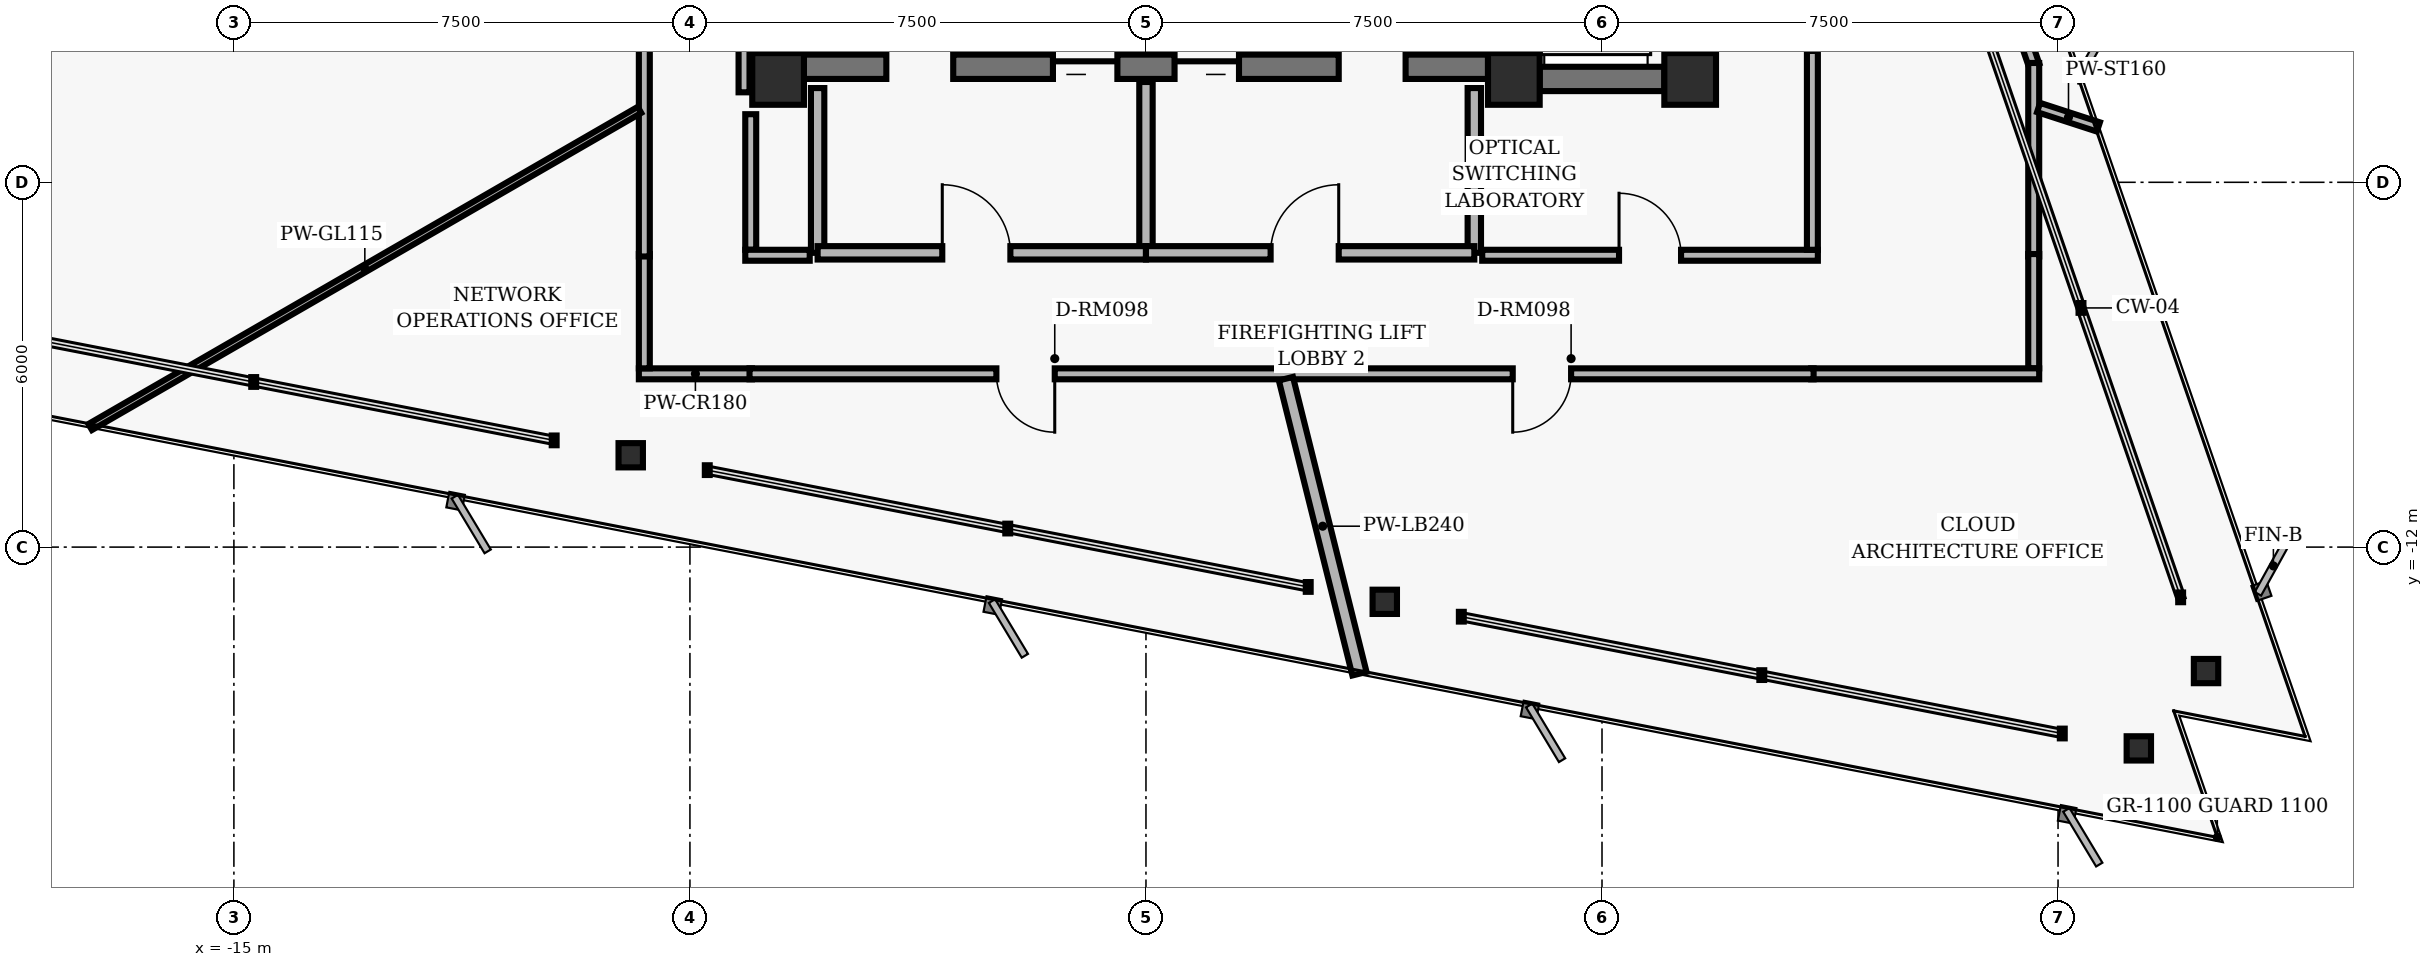
"""IFC4 building model, lengths in metres.
Left out: names, types, materials, properties, quantities, classifications, styles, units other than length and angle.
Written with IfcOpenShell. Run it as: python <this file> out.ifc"""

import sys

from ifc_helpers import new_model, si_unit, direction, frame, frame_2d, origin, origin_2d, place, context, subcontext, project, spatial, rectangle, hollow_rectangle, i_section, extrude, element, fill, save


model = new_model("IFC4")
c1 = context("Model", 3, precision=1e-05, world=origin(), true_north=direction((0.0, 1.0)))
c2 = subcontext(c1, "Body", "Model", "MODEL_VIEW")
j1 = project(units=[si_unit("LENGTHUNIT", "METRE"), si_unit("PLANEANGLEUNIT", "RADIAN")], contexts=[c1])
p1 = place(None, origin())
s1 = spatial("IfcSite", under=j1, at=p1, CompositionType="ELEMENT")
p2 = place(p1, origin())
s2 = spatial("IfcBuilding", under=s1, at=p2, CompositionType="ELEMENT")
p3 = place(p2, frame((0.0, 0.0, 153.28)))
s3 = spatial("IfcBuildingStorey", under=s2, at=p3, CompositionType="ELEMENT", Elevation=153.28)
for number, where, z_axis, x_axis in (
    (1, (-6.05, -4.3, 0.0), (0.0, 0.0, 1.0), (1.0, 0.0, 0.0)),
    (2, (6.05, -4.3, 0.0), (0.0, 0.0, 1.0), (1.0, 0.0, 0.0)),
    (3, (8.95, -4.3, 0.0), (0.0, 0.0, 1.0), (1.0, 0.0, 0.0)),
):
    element("IfcColumn", number, at=place(p3, frame(where, z_axis=z_axis, x_axis=x_axis)), inside=s3, PredefinedType="COLUMN", context=c2, shape_type="SweptSolid", body=[
        extrude(hollow_rectangle(XDim=0.85, YDim=0.85, WallThickness=0.055, InnerFilletRadius=0.02, OuterFilletRadius=0.04, at=origin_2d()), origin(), (0.0, 0.0, 1.0), 3.04),
    ])
for number, where, z_axis, x_axis in (
    (4, (-6.05, -3.875, 0.0), (0.0, 0.0, 1.0), (0.0, 1.0, 0.0)),
    (5, (6.05, -3.875, 0.0), (0.0, 0.0, 1.0), (0.0, 1.0, 0.0)),
):
    element("IfcWall", number, at=place(p3, frame(where, z_axis=z_axis, x_axis=x_axis)), inside=s3, PredefinedType="SHEAR", context=c2, shape_type="SweptSolid", body=[
        extrude(rectangle(XDim=3.45, YDim=0.6, at=frame_2d((1.725, 0.0))), origin(), (0.0, 0.0, 1.0), 2.788),
    ])
for number, where, z_axis, x_axis in (
    (6, (-1.94, -4.1, 0.0), (0.0, 0.0, 1.0), (0.0, 1.0, 0.0)),
    (7, (1.94, -4.1, 0.0), (0.0, 0.0, 1.0), (0.0, 1.0, 0.0)),
):
    element("IfcWall", number, at=place(p3, frame(where, z_axis=z_axis, x_axis=x_axis)), inside=s3, PredefinedType="SHEAR", context=c2, shape_type="SweptSolid", body=[
        extrude(rectangle(XDim=8.2, YDim=0.35, at=frame_2d((4.1, 0.0))), origin(), (0.0, 0.0, 1.0), 2.788),
    ])
p4 = place(p3, frame((-5.625, -4.1, 0.0), z_axis=(0.0, 0.0, 1.0), x_axis=(1.0, 0.0, 0.0)))
e8 = element("IfcWall", 8, at=p4, inside=s3, PredefinedType="SHEAR", context=c2, shape_type="SweptSolid", body=[
    extrude(rectangle(XDim=11.25, YDim=0.4, at=frame_2d((5.625, 0.0))), origin(), (0.0, 0.0, 1.0), 2.788),
])
p5 = place(p4, frame((1.355, 0.0, 0.0)))
e9 = element("IfcOpeningElement", 9, at=p5, cuts=e8, PredefinedType="OPENING", context=c2, shape_type="SweptSolid", body=[
    extrude(rectangle(XDim=1.1, YDim=2.04, at=frame_2d((0.55, 1.02))), frame((0.0, 0.21, 0.0), z_axis=(0.0, -1.0, 0.0), x_axis=(1.0, 0.0, 0.0)), (0.0, 0.0, 1.0), 0.42),
])
p6 = place(p4, frame((8.795, 0.0, 0.0)))
e10 = element("IfcOpeningElement", 10, at=p6, cuts=e8, PredefinedType="OPENING", context=c2, shape_type="SweptSolid", body=[
    extrude(rectangle(XDim=1.1, YDim=2.04, at=frame_2d((0.55, 1.02))), frame((0.0, 0.21, 0.0), z_axis=(0.0, -1.0, 0.0), x_axis=(1.0, 0.0, 0.0)), (0.0, 0.0, 1.0), 0.42),
])
p7 = place(p4, frame((4.095, 0.0, 0.0)))
e11 = element("IfcOpeningElement", 11, at=p7, cuts=e8, PredefinedType="OPENING", context=c2, shape_type="SweptSolid", body=[
    extrude(rectangle(XDim=1.06, YDim=2.04, at=frame_2d((0.53, 1.02))), frame((0.0, 0.21, 0.0), z_axis=(0.0, -1.0, 0.0), x_axis=(1.0, 0.0, 0.0)), (0.0, 0.0, 1.0), 0.42),
])
p8 = place(p4, frame((6.095, 0.0, 0.0)))
e12 = element("IfcOpeningElement", 12, at=p8, cuts=e8, PredefinedType="OPENING", context=c2, shape_type="SweptSolid", body=[
    extrude(rectangle(XDim=1.06, YDim=2.04, at=frame_2d((0.53, 1.02))), frame((0.0, 0.21, 0.0), z_axis=(0.0, -1.0, 0.0), x_axis=(1.0, 0.0, 0.0)), (0.0, 0.0, 1.0), 0.42),
])
p9 = place(p3, frame((8.95, -3.875, 0.0), z_axis=(0.0, 0.0, 1.0), x_axis=(0.0, 1.0, 0.0)))
e13 = element("IfcWall", 13, at=p9, inside=s3, PredefinedType="SHEAR", context=c2, shape_type="SweptSolid", body=[
    extrude(rectangle(XDim=7.95, YDim=0.6, at=frame_2d((3.975, 0.0))), origin(), (0.0, 0.0, 1.0), 2.788),
])
p10 = place(p9, frame((0.55, 0.0, 0.0)))
e14 = element("IfcOpeningElement", 14, at=p10, cuts=e13, PredefinedType="OPENING", context=c2, shape_type="SweptSolid", body=[
    extrude(rectangle(XDim=1.06, YDim=2.04, at=frame_2d((0.53, 1.02))), frame((0.0, 0.31, 0.0), z_axis=(0.0, -1.0, 0.0), x_axis=(1.0, 0.0, 0.0)), (0.0, 0.0, 1.0), 0.62),
])
p11 = place(p9, frame((3.445, 0.0, 0.0)))
e15 = element("IfcOpeningElement", 15, at=p11, cuts=e13, PredefinedType="OPENING", context=c2, shape_type="SweptSolid", body=[
    extrude(rectangle(XDim=1.06, YDim=2.04, at=frame_2d((0.53, 1.02))), frame((0.0, 0.31, 0.0), z_axis=(0.0, -1.0, 0.0), x_axis=(1.0, 0.0, 0.0)), (0.0, 0.0, 1.0), 0.62),
])
p12 = place(p9, frame((6.33, 0.0, 0.0)))
e16 = element("IfcOpeningElement", 16, at=p12, cuts=e13, PredefinedType="OPENING", context=c2, shape_type="SweptSolid", body=[
    extrude(rectangle(XDim=1.06, YDim=2.04, at=frame_2d((0.53, 1.02))), frame((0.0, 0.31, 0.0), z_axis=(0.0, -1.0, 0.0), x_axis=(1.0, 0.0, 0.0)), (0.0, 0.0, 1.0), 0.62),
])
p13 = place(p3, frame((6.475, -4.3, 0.0), z_axis=(0.0, 0.0, 1.0), x_axis=(1.0, 0.0, 0.0)))
e17 = element("IfcWall", 17, at=p13, inside=s3, PredefinedType="SHEAR", context=c2, shape_type="SweptSolid", body=[
    extrude(rectangle(XDim=2.05, YDim=0.4, at=frame_2d((1.025, 0.0))), origin(), (0.0, 0.0, 1.0), 2.788),
])
for number, where, z_axis, x_axis in (
    (18, (17.434, -14.039, 0.0), (0.0, 0.0, 1.0), (1.0, 0.0, 0.0)),
    (19, (-8.474, -10.49, 0.0), (0.0, 0.0, 1.0), (1.0, 0.0, 0.0)),
    (20, (3.927, -12.9, 0.0), (0.0, 0.0, 1.0), (1.0, 0.0, 0.0)),
    (21, (16.329, -15.311, 0.0), (0.0, 0.0, 1.0), (1.0, 0.0, 0.0)),
):
    element("IfcColumn", number, at=place(p3, frame(where, z_axis=z_axis, x_axis=x_axis)), inside=s3, PredefinedType="COLUMN", context=c2, shape_type="SweptSolid", body=[
        extrude(i_section(OverallWidth=0.401, OverallDepth=0.399, WebThickness=0.025, FlangeThickness=0.04, FilletRadius=0.018, at=origin_2d()), origin(), (0.0, 0.0, 1.0), 3.04),
    ])
for number, where, z_axis, x_axis in (
    (22, (-5.4, -7.16, 0.0), (0.0, 0.0, 1.0), (0.0, 1.0, 0.0)),
    (23, (5.4, -7.16, 0.0), (0.0, 0.0, 1.0), (0.0, 1.0, 0.0)),
):
    element("IfcWall", number, at=place(p3, frame(where, z_axis=z_axis, x_axis=x_axis)), inside=s3, PredefinedType="PARTITIONING", context=c2, shape_type="SweptSolid", body=[
        extrude(rectangle(XDim=2.71, YDim=0.22, at=frame_2d((1.355, 0.0))), origin(), (0.0, 0.0, 1.0), 2.763),
    ])
p14 = place(p3, frame((0.0, -7.16, 0.0), z_axis=(0.0, 0.0, 1.0), x_axis=(0.0, 1.0, 0.0)))
e24 = element("IfcWall", 24, at=p14, inside=s3, PredefinedType="PARTITIONING", context=c2, shape_type="SweptSolid", body=[
    extrude(rectangle(XDim=2.81, YDim=0.22, at=frame_2d((1.405, 0.0))), origin(), (0.0, 0.0, 1.0), 2.763),
])
p15 = place(p3, frame((-5.4, -7.16, 0.0), z_axis=(0.0, 0.0, 1.0), x_axis=(1.0, 0.0, 0.0)))
e25 = element("IfcWall", 25, at=p15, inside=s3, PredefinedType="PARTITIONING", context=c2, shape_type="SweptSolid", body=[
    extrude(rectangle(XDim=5.4, YDim=0.22, at=frame_2d((2.7, 0.0))), origin(), (0.0, 0.0, 1.0), 2.33),
])
p16 = place(p15, frame((2.05, 0.0, 0.0)))
e26 = element("IfcOpeningElement", 26, at=p16, cuts=e25, PredefinedType="OPENING", context=c2, shape_type="SweptSolid", body=[
    extrude(rectangle(XDim=1.12, YDim=2.02, at=frame_2d((0.56, 1.01))), frame((0.0, 0.12, 0.0), z_axis=(0.0, -1.0, 0.0), x_axis=(1.0, 0.0, 0.0)), (0.0, 0.0, 1.0), 0.24),
])
p17 = place(p3, frame((0.0, -7.16, 0.0), z_axis=(0.0, 0.0, 1.0), x_axis=(1.0, 0.0, 0.0)))
e27 = element("IfcWall", 27, at=p17, inside=s3, PredefinedType="PARTITIONING", context=c2, shape_type="SweptSolid", body=[
    extrude(rectangle(XDim=5.4, YDim=0.22, at=frame_2d((2.7, 0.0))), origin(), (0.0, 0.0, 1.0), 2.33),
])
p18 = place(p17, frame((2.05, 0.0, 0.0)))
e28 = element("IfcOpeningElement", 28, at=p18, cuts=e27, PredefinedType="OPENING", context=c2, shape_type="SweptSolid", body=[
    extrude(rectangle(XDim=1.12, YDim=2.02, at=frame_2d((0.56, 1.01))), frame((0.0, 0.12, 0.0), z_axis=(0.0, -1.0, 0.0), x_axis=(1.0, 0.0, 0.0)), (0.0, 0.0, 1.0), 0.24),
])
p19 = place(p3, frame((-6.48, -9.15, 0.0), z_axis=(0.0, 0.0, 1.0), x_axis=(-1.0, 0.0, 0.0)))
e29 = element("IfcWall", 29, at=p19, inside=s3, PredefinedType="PARTITIONING", context=c2, shape_type="SweptSolid", body=[
    extrude(rectangle(XDim=1.86, YDim=0.18, at=frame_2d((0.93, 0.0))), origin(), (0.0, 0.0, 1.0), 2.33),
])
p20 = place(p3, frame((-8.25, -9.06, 0.0), z_axis=(0.0, 0.0, 1.0), x_axis=(0.0, 1.0, 0.0)))
e30 = element("IfcWall", 30, at=p20, inside=s3, PredefinedType="PARTITIONING", context=c2, shape_type="SweptSolid", body=[
    extrude(rectangle(XDim=1.88, YDim=0.18, at=frame_2d((0.94, 0.0))), origin(), (0.0, 0.0, 1.0), 2.763),
])
p21 = place(p3, frame((-8.25, -7.22, 0.0), z_axis=(0.0, 0.0, 1.0), x_axis=(0.0, 1.0, 0.0)))
e31 = element("IfcWall", 31, at=p21, inside=s3, PredefinedType="PARTITIONING", context=c2, shape_type="SweptSolid", body=[
    extrude(rectangle(XDim=14.44, YDim=0.18, at=frame_2d((7.22, 0.0))), origin(), (0.0, 0.0, 1.0), 2.763),
])
p22 = place(p21, frame((7.366, 0.0, 0.0)))
e32 = element("IfcOpeningElement", 32, at=p22, cuts=e31, PredefinedType="OPENING", context=c2, shape_type="SweptSolid", body=[
    extrude(rectangle(XDim=0.96, YDim=2.02, at=frame_2d((0.48, 1.01))), frame((0.0, 0.1, 0.0), z_axis=(0.0, -1.0, 0.0), x_axis=(1.0, 0.0, 0.0)), (0.0, 0.0, 1.0), 0.2),
])
p23 = place(p3, frame((-6.61, 4.94, 0.0), z_axis=(0.0, 0.0, 1.0), x_axis=(0.0, -1.0, 0.0)))
e33 = element("IfcWall", 33, at=p23, inside=s3, PredefinedType="PARTITIONING", context=c2, shape_type="SweptSolid", body=[
    extrude(rectangle(XDim=9.46, YDim=0.18, at=frame_2d((4.73, 0.0))), origin(), (0.0, 0.0, 1.0), 2.763),
])
p24 = place(p3, frame((-6.5, -4.88, 0.0), z_axis=(0.0, 0.0, 1.0), x_axis=(0.0, -1.0, 0.0)))
e34 = element("IfcWall", 34, at=p24, inside=s3, PredefinedType="PARTITIONING", context=c2, shape_type="SweptSolid", body=[
    extrude(rectangle(XDim=2.23, YDim=0.18, at=frame_2d((1.115, 0.0))), origin(), (0.0, 0.0, 1.0), 2.763),
])
p25 = place(p3, frame((-6.59, -7.2, 0.0), z_axis=(0.0, 0.0, 1.0), x_axis=(1.0, 0.0, 0.0)))
e35 = element("IfcWall", 35, at=p25, inside=s3, PredefinedType="PARTITIONING", context=c2, shape_type="SweptSolid", body=[
    extrude(rectangle(XDim=1.06, YDim=0.18, at=frame_2d((0.53, 0.0))), origin(), (0.0, 0.0, 1.0), 2.763),
])
p26 = place(p3, frame((5.53, -7.2, 0.0), z_axis=(0.0, 0.0, 1.0), x_axis=(1.0, 0.0, 0.0)))
e36 = element("IfcWall", 36, at=p26, inside=s3, PredefinedType="PARTITIONING", context=c2, shape_type="SweptSolid", body=[
    extrude(rectangle(XDim=5.52, YDim=0.18, at=frame_2d((2.76, 0.0))), origin(), (0.0, 0.0, 1.0), 2.33),
])
p27 = place(p26, frame((2.25, 0.0, 0.0)))
e37 = element("IfcOpeningElement", 37, at=p27, cuts=e36, PredefinedType="OPENING", context=c2, shape_type="SweptSolid", body=[
    extrude(rectangle(XDim=1.02, YDim=2.02, at=frame_2d((0.51, 1.01))), frame((0.0, 0.1, 0.0), z_axis=(0.0, -1.0, 0.0), x_axis=(1.0, 0.0, 0.0)), (0.0, 0.0, 1.0), 0.2),
])
p28 = place(p3, frame((10.96, -7.11, 0.0), z_axis=(0.0, 0.0, 1.0), x_axis=(0.0, 1.0, 0.0)))
e38 = element("IfcWall", 38, at=p28, inside=s3, PredefinedType="PARTITIONING", context=c2, shape_type="SweptSolid", body=[
    extrude(rectangle(XDim=3.271, YDim=0.18, at=frame_2d((1.635, 0.0))), origin(), (0.0, 0.0, 1.0), 2.763),
])
p29 = place(p3, frame((10.954, 6.533, 0.0), z_axis=(0.0, 0.0, 1.0), x_axis=(0.325553439946, -0.945523642084, 0.0)))
e39 = element("IfcWall", 39, at=p29, inside=s3, PredefinedType="PARTITIONING", context=c2, shape_type="SweptSolid", body=[
    extrude(rectangle(XDim=11.22, YDim=0.18, at=frame_2d((5.61, 0.0))), origin(), (0.0, 0.0, 1.0), 2.763),
])
p30 = place(p3, frame((14.6, -4.038, 0.0), z_axis=(0.0, 0.0, 1.0), x_axis=(0.0, -1.0, 0.0)))
e40 = element("IfcWall", 40, at=p30, inside=s3, PredefinedType="PARTITIONING", context=c2, shape_type="SweptSolid", body=[
    extrude(rectangle(XDim=3.182, YDim=0.18, at=frame_2d((1.591, 0.0))), origin(), (0.0, 0.0, 1.0), 2.763),
])
p31 = place(p3, frame((14.6, -7.18, 0.0), z_axis=(0.0, 0.0, 1.0), x_axis=(0.0, -1.0, 0.0)))
e41 = element("IfcWall", 41, at=p31, inside=s3, PredefinedType="PARTITIONING", context=c2, shape_type="SweptSolid", body=[
    extrude(rectangle(XDim=1.88, YDim=0.18, at=frame_2d((0.94, 0.0))), origin(), (0.0, 0.0, 1.0), 2.763),
])
p32 = place(p3, frame((14.69, -9.15, 0.0), z_axis=(0.0, 0.0, 1.0), x_axis=(-1.0, 0.0, 0.0)))
e42 = element("IfcWall", 42, at=p32, inside=s3, PredefinedType="PARTITIONING", context=c2, shape_type="SweptSolid", body=[
    extrude(rectangle(XDim=3.75, YDim=0.18, at=frame_2d((1.875, 0.0))), origin(), (0.0, 0.0, 1.0), 2.763),
])
p33 = place(p3, frame((10.98, -9.15, 0.0), z_axis=(0.0, 0.0, 1.0), x_axis=(-1.0, 0.0, 0.0)))
e43 = element("IfcWall", 43, at=p33, inside=s3, PredefinedType="PARTITIONING", context=c2, shape_type="SweptSolid", body=[
    extrude(rectangle(XDim=17.5, YDim=0.18, at=frame_2d((8.75, 0.0))), origin(), (0.0, 0.0, 1.0), 2.33),
])
p34 = place(p33, frame((12.48, 0.0, 0.0)))
e44 = element("IfcOpeningElement", 44, at=p34, cuts=e43, PredefinedType="OPENING", context=c2, shape_type="SweptSolid", body=[
    extrude(rectangle(XDim=0.96, YDim=2.02, at=frame_2d((0.48, 1.01))), frame((0.0, 0.1, 0.0), z_axis=(0.0, -1.0, 0.0), x_axis=(1.0, 0.0, 0.0)), (0.0, 0.0, 1.0), 0.2),
])
p35 = place(p33, frame((3.988, 0.0, 0.0)))
e45 = element("IfcOpeningElement", 45, at=p35, cuts=e43, PredefinedType="OPENING", context=c2, shape_type="SweptSolid", body=[
    extrude(rectangle(XDim=0.96, YDim=2.02, at=frame_2d((0.48, 1.01))), frame((0.0, 0.1, 0.0), z_axis=(0.0, -1.0, 0.0), x_axis=(1.0, 0.0, 0.0)), (0.0, 0.0, 1.0), 0.2),
])
p36 = place(p3, frame((-8.33, -4.809, 0.0), z_axis=(0.0, 0.0, 1.0), x_axis=(-0.866024997974, -0.500000702884, 0.0)))
e46 = element("IfcWall", 46, at=p36, inside=s3, PredefinedType="MOVABLE", context=c2, shape_type="SweptSolid", body=[
    extrude(rectangle(XDim=10.431, YDim=0.115, at=frame_2d((5.215, 0.0))), origin(), (0.0, 0.0, 1.0), 2.132),
])
p37 = place(p3, frame((2.301, -9.23, 0.0), z_axis=(0.0, 0.0, 1.0), x_axis=(0.241903783585, -0.970300241929, 0.0)))
e47 = element("IfcWall", 47, at=p37, inside=s3, PredefinedType="PARTITIONING", context=c2, shape_type="SweptSolid", body=[
    extrude(rectangle(XDim=5.001, YDim=0.24, at=frame_2d((2.5, 0.0))), origin(), (0.0, 0.0, 1.0), 2.763),
])
p38 = place(p3, frame((14.68, -4.77, 0.0), z_axis=(0.0, 0.0, 1.0), x_axis=(0.951039270022, -0.309070067906, 0.0)))
e48 = element("IfcWall", 48, at=p38, inside=s3, PredefinedType="PARTITIONING", context=c2, shape_type="SweptSolid", body=[
    extrude(rectangle(XDim=1.035, YDim=0.16, at=frame_2d((0.518, 0.0))), origin(), (0.0, 0.0, 1.0), 2.763),
])
p39 = place(p5, origin())
e49 = element("IfcDoor", 49, at=p39, inside=s3, OperationType="SINGLE_SWING_LEFT", PredefinedType="DOOR", context=c2, shape_type="SweptSolid", body=[
    extrude(rectangle(XDim=1.1, YDim=2.04, at=frame_2d((0.55, 1.02))), frame((0.0, 0.025, 0.0), z_axis=(0.0, -1.0, 0.0), x_axis=(1.0, 0.0, 0.0)), (0.0, 0.0, 1.0), 0.05),
])
fill(e9, e49)
p40 = place(p6, origin())
e50 = element("IfcDoor", 50, at=p40, inside=s3, OperationType="SINGLE_SWING_RIGHT", PredefinedType="DOOR", context=c2, shape_type="SweptSolid", body=[
    extrude(rectangle(XDim=1.1, YDim=2.04, at=frame_2d((0.55, 1.02))), frame((0.0, 0.025, 0.0), z_axis=(0.0, -1.0, 0.0), x_axis=(1.0, 0.0, 0.0)), (0.0, 0.0, 1.0), 0.05),
])
fill(e10, e50)
p41 = place(p7, origin())
e51 = element("IfcDoor", 51, at=p41, inside=s3, OperationType="SLIDING_TO_LEFT", PredefinedType="DOOR", context=c2, shape_type="SweptSolid", body=[
    extrude(rectangle(XDim=1.06, YDim=2.04, at=frame_2d((0.53, 1.02))), frame((0.0, 0.025, 0.0), z_axis=(0.0, -1.0, 0.0), x_axis=(1.0, 0.0, 0.0)), (0.0, 0.0, 1.0), 0.05),
])
fill(e11, e51)
p42 = place(p8, origin())
e52 = element("IfcDoor", 52, at=p42, inside=s3, OperationType="SLIDING_TO_RIGHT", PredefinedType="DOOR", context=c2, shape_type="SweptSolid", body=[
    extrude(rectangle(XDim=1.06, YDim=2.04, at=frame_2d((0.53, 1.02))), frame((0.0, 0.025, 0.0), z_axis=(0.0, -1.0, 0.0), x_axis=(1.0, 0.0, 0.0)), (0.0, 0.0, 1.0), 0.05),
])
fill(e12, e52)
p43 = place(p16, origin())
e53 = element("IfcDoor", 53, at=p43, inside=s3, OperationType="SINGLE_SWING_LEFT", PredefinedType="DOOR", context=c2, shape_type="SweptSolid", body=[
    extrude(rectangle(XDim=1.12, YDim=2.02, at=frame_2d((0.56, 1.01))), frame((0.0, 0.025, 0.0), z_axis=(0.0, -1.0, 0.0), x_axis=(1.0, 0.0, 0.0)), (0.0, 0.0, 1.0), 0.05),
])
fill(e26, e53)
p44 = place(p18, origin())
e54 = element("IfcDoor", 54, at=p44, inside=s3, OperationType="SINGLE_SWING_RIGHT", PredefinedType="DOOR", context=c2, shape_type="SweptSolid", body=[
    extrude(rectangle(XDim=1.12, YDim=2.02, at=frame_2d((0.56, 1.01))), frame((0.0, 0.025, 0.0), z_axis=(0.0, -1.0, 0.0), x_axis=(1.0, 0.0, 0.0)), (0.0, 0.0, 1.0), 0.05),
])
fill(e28, e54)
p45 = place(p34, origin())
e55 = element("IfcDoor", 55, at=p45, inside=s3, OperationType="SINGLE_SWING_LEFT", PredefinedType="DOOR", context=c2, shape_type="SweptSolid", body=[
    extrude(rectangle(XDim=0.96, YDim=2.02, at=frame_2d((0.48, 1.01))), frame((0.0, 0.025, 0.0), z_axis=(0.0, -1.0, 0.0), x_axis=(1.0, 0.0, 0.0)), (0.0, 0.0, 1.0), 0.05),
])
fill(e44, e55)
p46 = place(p35, origin())
e56 = element("IfcDoor", 56, at=p46, inside=s3, OperationType="SINGLE_SWING_RIGHT", PredefinedType="DOOR", context=c2, shape_type="SweptSolid", body=[
    extrude(rectangle(XDim=0.96, YDim=2.02, at=frame_2d((0.48, 1.01))), frame((0.0, 0.025, 0.0), z_axis=(0.0, -1.0, 0.0), x_axis=(1.0, 0.0, 0.0)), (0.0, 0.0, 1.0), 0.05),
])
fill(e45, e56)
p47 = place(p27, origin())
e57 = element("IfcDoor", 57, at=p47, inside=s3, OperationType="SINGLE_SWING_LEFT", PredefinedType="DOOR", context=c2, shape_type="SweptSolid", body=[
    extrude(rectangle(XDim=1.02, YDim=2.02, at=frame_2d((0.51, 1.01))), frame((0.0, 0.025, 0.0), z_axis=(0.0, -1.0, 0.0), x_axis=(1.0, 0.0, 0.0)), (0.0, 0.0, 1.0), 0.05),
])
fill(e37, e57)
save(model, sys.argv[1])
